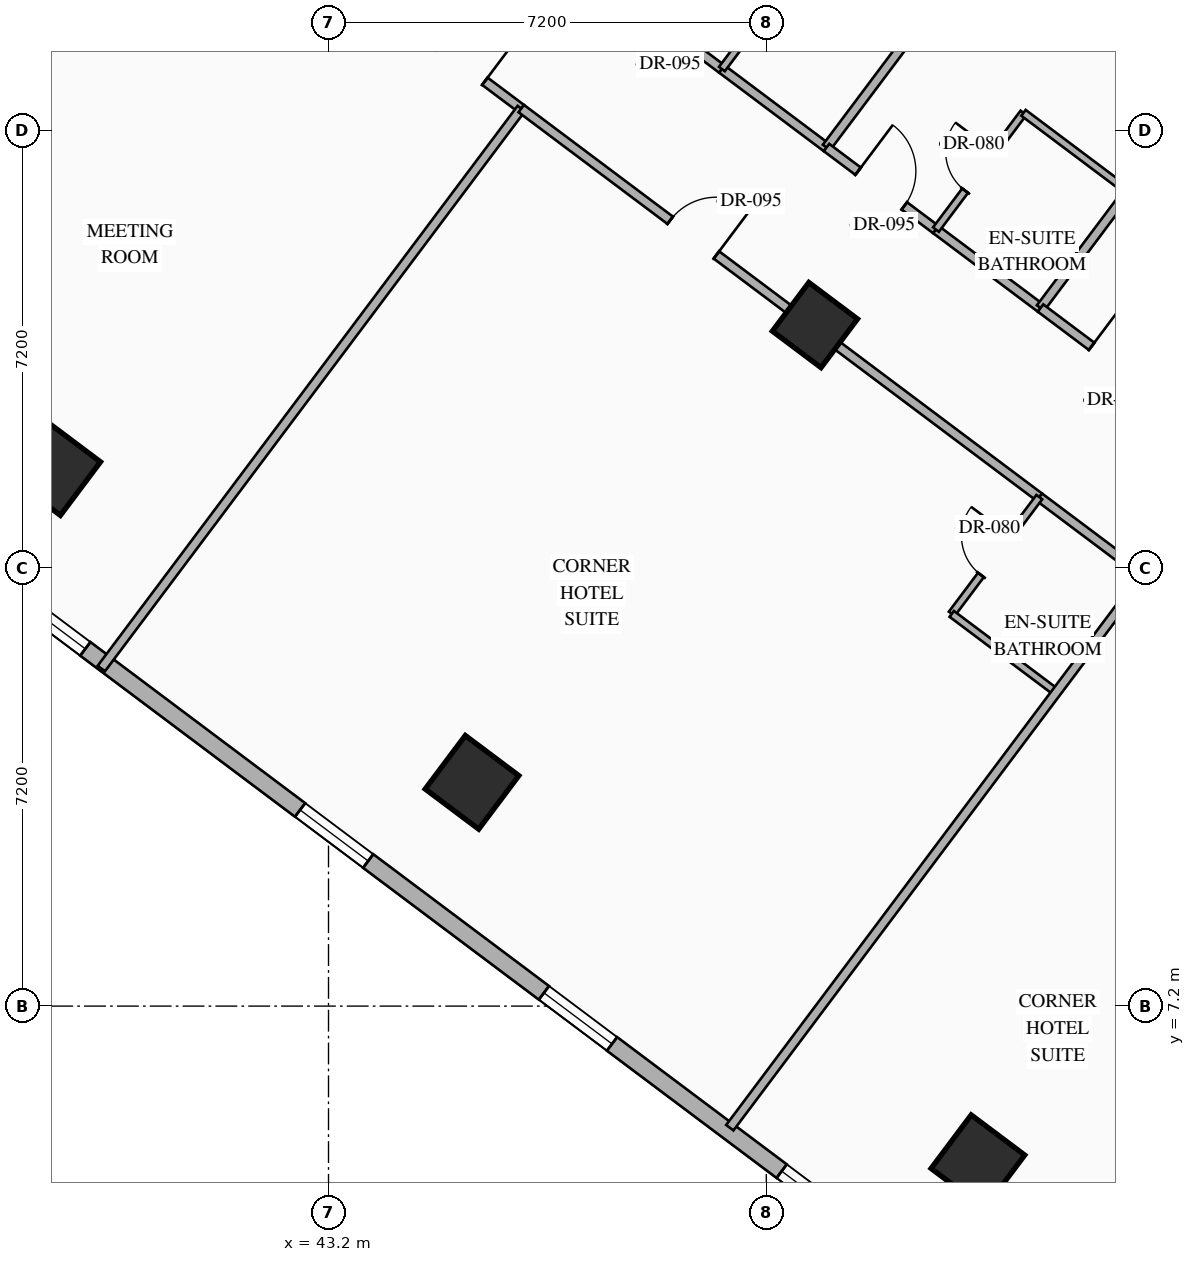
"""IFC4 building model, lengths in metres.
Left out: names, types, materials, properties, quantities, classifications, styles, units other than length and angle.
Written with IfcOpenShell. Run it as: python <this file> out.ifc"""

import sys

from ifc_helpers import new_model, si_unit, direction, frame, frame_2d, origin, origin_2d, place, context, subcontext, project, spatial, rectangle, hollow_rectangle, extrude, element, fill, save


model = new_model("IFC4")
c1 = context("Model", 3, precision=1e-05, world=origin(), true_north=direction((0.0, 1.0)))
c2 = subcontext(c1, "Body", "Model", "MODEL_VIEW")
j1 = project(units=[si_unit("LENGTHUNIT", "METRE"), si_unit("PLANEANGLEUNIT", "RADIAN")], contexts=[c1])
p1 = place(None, origin())
s1 = spatial("IfcSite", under=j1, at=p1, CompositionType="ELEMENT")
p2 = place(p1, origin())
s2 = spatial("IfcBuilding", under=s1, at=p2, CompositionType="ELEMENT")
p3 = place(p2, frame((0.0, 0.0, 60.05)))
s3 = spatial("IfcBuildingStorey", under=s2, at=p3, CompositionType="ELEMENT", Elevation=60.05)
for number, where, z_axis, x_axis in (
    (1, (38.68, 16.04, 0.0), (0.0, 0.0, 1.0), (0.8, -0.6, 0.0)),
    (2, (45.56, 10.88, 0.0), (0.0, 0.0, 1.0), (0.8, -0.6, 0.0)),
):
    element("IfcColumn", number, at=place(p3, frame(where, z_axis=z_axis, x_axis=x_axis)), inside=s3, PredefinedType="COLUMN", context=c2, shape_type="SweptSolid", body=[
        extrude(hollow_rectangle(XDim=1.1, YDim=1.1, WallThickness=0.04, at=origin_2d()), origin(), (0.0, 0.0, 1.0), 3.35),
    ])
p4 = place(p3, frame((51.2, 18.4, 0.0), z_axis=(0.0, 0.0, 1.0), x_axis=(0.799999996291, -0.600000004945, 0.0)))
e3 = element("IfcColumn", 3, at=p4, inside=s3, PredefinedType="COLUMN", context=c2, shape_type="SweptSolid", body=[
    extrude(hollow_rectangle(XDim=1.0, YDim=1.0, WallThickness=0.038, at=origin_2d()), origin(), (0.0, 0.0, 1.0), 3.35),
])
p5 = place(p3, frame((53.88, 4.64, 0.0), z_axis=(0.0, 0.0, 1.0), x_axis=(0.799999996291, -0.600000004945, 0.0)))
e4 = element("IfcColumn", 4, at=p5, inside=s3, PredefinedType="COLUMN", context=c2, shape_type="SweptSolid", body=[
    extrude(hollow_rectangle(XDim=1.1, YDim=1.1, WallThickness=0.04, at=origin_2d()), origin(), (0.0, 0.0, 1.0), 3.35),
])
p6 = place(p3, frame((44.86, 40.73, 0.0), z_axis=(0.0, 0.0, 1.0), x_axis=(0.800006902154, -0.599990797017, 0.0)))
e5 = element("IfcWall", 5, at=p6, inside=s3, PredefinedType="STANDARD", context=c2, shape_type="SweptSolid", body=[
    extrude(rectangle(XDim=29.712, YDim=0.28, at=frame_2d((14.856, 0.0))), origin(), (0.0, 0.0, 1.0), 3.13),
])
p7 = place(p6, frame((14.249, 0.0, 0.0)))
e6 = element("IfcOpeningElement", 6, at=p7, cuts=e5, PredefinedType="OPENING", context=c2, shape_type="SweptSolid", body=[
    extrude(rectangle(XDim=1.1, YDim=2.2, at=frame_2d((0.55, 1.1))), frame((0.0, 0.15, 0.0), z_axis=(0.0, -1.0, 0.0), x_axis=(1.0, 0.0, 0.0)), (0.0, 0.0, 1.0), 0.3),
])
p8 = place(p6, frame((1.612, 0.0, 0.85)))
e7 = element("IfcOpeningElement", 7, at=p8, cuts=e5, PredefinedType="OPENING", context=c2, shape_type="SweptSolid", body=[
    extrude(rectangle(XDim=1.4, YDim=1.8, at=frame_2d((0.7, 0.9))), frame((0.0, 0.15, 0.0), z_axis=(0.0, -1.0, 0.0), x_axis=(1.0, 0.0, 0.0)), (0.0, 0.0, 1.0), 0.3),
])
p9 = place(p6, frame((5.667, 0.0, 0.85)))
e8 = element("IfcOpeningElement", 8, at=p9, cuts=e5, PredefinedType="OPENING", context=c2, shape_type="SweptSolid", body=[
    extrude(rectangle(XDim=1.4, YDim=1.8, at=frame_2d((0.7, 0.9))), frame((0.0, 0.15, 0.0), z_axis=(0.0, -1.0, 0.0), x_axis=(1.0, 0.0, 0.0)), (0.0, 0.0, 1.0), 0.3),
])
p10 = place(p6, frame((9.912, 0.0, 0.85)))
e9 = element("IfcOpeningElement", 9, at=p10, cuts=e5, PredefinedType="OPENING", context=c2, shape_type="SweptSolid", body=[
    extrude(rectangle(XDim=1.4, YDim=1.8, at=frame_2d((0.7, 0.9))), frame((0.0, 0.15, 0.0), z_axis=(0.0, -1.0, 0.0), x_axis=(1.0, 0.0, 0.0)), (0.0, 0.0, 1.0), 0.3),
])
p11 = place(p6, frame((18.803, 0.0, 0.85)))
e10 = element("IfcOpeningElement", 10, at=p11, cuts=e5, PredefinedType="OPENING", context=c2, shape_type="SweptSolid", body=[
    extrude(rectangle(XDim=1.4, YDim=1.8, at=frame_2d((0.7, 0.9))), frame((0.0, 0.15, 0.0), z_axis=(0.0, -1.0, 0.0), x_axis=(1.0, 0.0, 0.0)), (0.0, 0.0, 1.0), 0.3),
])
p12 = place(p6, frame((22.645, 0.0, 0.85)))
e11 = element("IfcOpeningElement", 11, at=p12, cuts=e5, PredefinedType="OPENING", context=c2, shape_type="SweptSolid", body=[
    extrude(rectangle(XDim=1.4, YDim=1.8, at=frame_2d((0.7, 0.9))), frame((0.0, 0.15, 0.0), z_axis=(0.0, -1.0, 0.0), x_axis=(1.0, 0.0, 0.0)), (0.0, 0.0, 1.0), 0.3),
])
p13 = place(p6, frame((27.668, 0.0, 0.85)))
e12 = element("IfcOpeningElement", 12, at=p13, cuts=e5, PredefinedType="OPENING", context=c2, shape_type="SweptSolid", body=[
    extrude(rectangle(XDim=1.4, YDim=1.8, at=frame_2d((0.7, 0.9))), frame((0.0, 0.15, 0.0), z_axis=(0.0, -1.0, 0.0), x_axis=(1.0, 0.0, 0.0)), (0.0, 0.0, 1.0), 0.3),
])
p14 = place(p3, frame((53.318, 2.487, 0.0), z_axis=(0.0, 0.0, 1.0), x_axis=(-0.800004174678, 0.599994433723, 0.0)))
e13 = element("IfcWall", 13, at=p14, inside=s3, PredefinedType="STANDARD", context=c2, shape_type="SweptSolid", body=[
    extrude(rectangle(XDim=35.089, YDim=0.28, at=frame_2d((17.544, 0.0))), origin(), (0.0, 0.0, 1.0), 3.13),
])
p15 = place(p14, frame((1.931, 0.0, 0.85)))
e14 = element("IfcOpeningElement", 14, at=p15, cuts=e13, PredefinedType="OPENING", context=c2, shape_type="SweptSolid", body=[
    extrude(rectangle(XDim=1.4, YDim=1.8, at=frame_2d((0.7, 0.9))), frame((0.0, 0.15, 0.0), z_axis=(0.0, -1.0, 0.0), x_axis=(1.0, 0.0, 0.0)), (0.0, 0.0, 1.0), 0.3),
])
p16 = place(p14, frame((6.819, 0.0, 0.85)))
e15 = element("IfcOpeningElement", 15, at=p16, cuts=e13, PredefinedType="OPENING", context=c2, shape_type="SweptSolid", body=[
    extrude(rectangle(XDim=1.4, YDim=1.8, at=frame_2d((0.7, 0.9))), frame((0.0, 0.15, 0.0), z_axis=(0.0, -1.0, 0.0), x_axis=(1.0, 0.0, 0.0)), (0.0, 0.0, 1.0), 0.3),
])
p17 = place(p14, frame((11.832, 0.0, 0.85)))
e16 = element("IfcOpeningElement", 16, at=p17, cuts=e13, PredefinedType="OPENING", context=c2, shape_type="SweptSolid", body=[
    extrude(rectangle(XDim=1.4, YDim=1.8, at=frame_2d((0.7, 0.9))), frame((0.0, 0.15, 0.0), z_axis=(0.0, -1.0, 0.0), x_axis=(1.0, 0.0, 0.0)), (0.0, 0.0, 1.0), 0.3),
])
p18 = place(p14, frame((17.647, 0.0, 0.85)))
e17 = element("IfcOpeningElement", 17, at=p18, cuts=e13, PredefinedType="OPENING", context=c2, shape_type="SweptSolid", body=[
    extrude(rectangle(XDim=1.4, YDim=1.8, at=frame_2d((0.7, 0.9))), frame((0.0, 0.15, 0.0), z_axis=(0.0, -1.0, 0.0), x_axis=(1.0, 0.0, 0.0)), (0.0, 0.0, 1.0), 0.3),
])
p19 = place(p14, frame((21.857, 0.0, 0.85)))
e18 = element("IfcOpeningElement", 18, at=p19, cuts=e13, PredefinedType="OPENING", context=c2, shape_type="SweptSolid", body=[
    extrude(rectangle(XDim=1.4, YDim=1.8, at=frame_2d((0.7, 0.9))), frame((0.0, 0.15, 0.0), z_axis=(0.0, -1.0, 0.0), x_axis=(1.0, 0.0, 0.0)), (0.0, 0.0, 1.0), 0.3),
])
p20 = place(p14, frame((26.87, 0.0, 0.85)))
e19 = element("IfcOpeningElement", 19, at=p20, cuts=e13, PredefinedType="OPENING", context=c2, shape_type="SweptSolid", body=[
    extrude(rectangle(XDim=1.4, YDim=1.8, at=frame_2d((0.7, 0.9))), frame((0.0, 0.15, 0.0), z_axis=(0.0, -1.0, 0.0), x_axis=(1.0, 0.0, 0.0)), (0.0, 0.0, 1.0), 0.3),
])
p21 = place(p14, frame((31.757, 0.0, 0.85)))
e20 = element("IfcOpeningElement", 20, at=p21, cuts=e13, PredefinedType="OPENING", context=c2, shape_type="SweptSolid", body=[
    extrude(rectangle(XDim=1.4, YDim=1.8, at=frame_2d((0.7, 0.9))), frame((0.0, 0.15, 0.0), z_axis=(0.0, -1.0, 0.0), x_axis=(1.0, 0.0, 0.0)), (0.0, 0.0, 1.0), 0.3),
])
p22 = place(p3, frame((43.037, 24.46, 0.0), z_axis=(0.0, 0.0, 1.0), x_axis=(0.799971872363, -0.600037501685, 0.0)))
e21 = element("IfcWall", 21, at=p22, inside=s3, PredefinedType="PARTITIONING", context=c2, shape_type="SweptSolid", body=[
    extrude(rectangle(XDim=4.167, YDim=0.15, at=frame_2d((2.083, 0.0))), origin(), (0.0, 0.0, 1.0), 2.425),
])
p23 = place(p22, frame((2.468, 0.0, 0.0)))
e22 = element("IfcOpeningElement", 22, at=p23, cuts=e21, PredefinedType="OPENING", context=c2, shape_type="SweptSolid", body=[
    extrude(rectangle(XDim=0.95, YDim=2.15, at=frame_2d((0.475, 1.075))), frame((0.0, 0.085, 0.0), z_axis=(0.0, -1.0, 0.0), x_axis=(1.0, 0.0, 0.0)), (0.0, 0.0, 1.0), 0.17),
])
p24 = place(p3, frame((33.384, 17.312, 0.0), z_axis=(0.0, 0.0, 1.0), x_axis=(0.600008743659, 0.799993442181, 0.0)))
e23 = element("IfcWall", 23, at=p24, inside=s3, PredefinedType="PARTITIONING", context=c2, shape_type="SweptSolid", body=[
    extrude(rectangle(XDim=8.935, YDim=0.15, at=frame_2d((4.468, 0.0))), origin(), (0.0, 0.0, 1.0), 3.13),
])
p25 = place(p3, frame((39.464, 12.752, 0.0), z_axis=(0.0, 0.0, 1.0), x_axis=(0.6, 0.8, 0.0)))
e24 = element("IfcWall", 24, at=p25, inside=s3, PredefinedType="PARTITIONING", context=c2, shape_type="SweptSolid", body=[
    extrude(rectangle(XDim=11.51, YDim=0.15, at=frame_2d((5.755, 0.0))), origin(), (0.0, 0.0, 1.0), 3.13),
])
p26 = place(p3, frame((47.87, 23.96, 0.0), z_axis=(0.0, 0.0, 1.0), x_axis=(0.8, -0.6, 0.0)))
e25 = element("IfcWall", 25, at=p26, inside=s3, PredefinedType="PARTITIONING", context=c2, shape_type="SweptSolid", body=[
    extrude(rectangle(XDim=2.25, YDim=0.15, at=frame_2d((1.125, 0.0))), origin(), (0.0, 0.0, 1.0), 2.775),
])
p27 = place(p26, frame((0.65, 0.0, 0.0)))
e26 = element("IfcOpeningElement", 26, at=p27, cuts=e25, PredefinedType="OPENING", context=c2, shape_type="SweptSolid", body=[
    extrude(rectangle(XDim=0.95, YDim=2.15, at=frame_2d((0.475, 1.075))), frame((0.0, 0.085, 0.0), z_axis=(0.0, -1.0, 0.0), x_axis=(1.0, 0.0, 0.0)), (0.0, 0.0, 1.0), 0.17),
])
p28 = place(p3, frame((49.67, 22.61, 0.0), z_axis=(0.0, 0.0, 1.0), x_axis=(0.79998637334, -0.60001816845, 0.0)))
e27 = element("IfcWall", 27, at=p28, inside=s3, PredefinedType="PARTITIONING", context=c2, shape_type="SweptSolid", body=[
    extrude(rectangle(XDim=2.15, YDim=0.15, at=frame_2d((1.075, 0.0))), origin(), (0.0, 0.0, 1.0), 2.775),
])
p29 = place(p3, frame((49.67, 22.61, 0.0), z_axis=(0.0, 0.0, 1.0), x_axis=(0.600065100855, 0.79995117022, 0.0)))
e28 = element("IfcWall", 28, at=p29, inside=s3, PredefinedType="PARTITIONING", context=c2, shape_type="SweptSolid", body=[
    extrude(rectangle(XDim=2.4, YDim=0.12, at=frame_2d((1.2, 0.0))), origin(), (0.0, 0.0, 1.0), 3.13),
])
p30 = place(p29, frame((0.8, 0.0, 0.0)))
e29 = element("IfcOpeningElement", 29, at=p30, cuts=e28, PredefinedType="OPENING", context=c2, shape_type="SweptSolid", body=[
    extrude(rectangle(XDim=0.8, YDim=2.06, at=frame_2d((0.4, 1.03))), frame((0.0, 0.07, 0.0), z_axis=(0.0, -1.0, 0.0), x_axis=(1.0, 0.0, 0.0)), (0.0, 0.0, 1.0), 0.14),
])
p31 = place(p3, frame((51.39, 21.32, 0.0), z_axis=(0.0, 0.0, 1.0), x_axis=(0.60001014597, 0.799992390422, 0.0)))
e30 = element("IfcWall", 30, at=p31, inside=s3, PredefinedType="PARTITIONING", context=c2, shape_type="SweptSolid", body=[
    extrude(rectangle(XDim=11.55, YDim=0.15, at=frame_2d((5.775, 0.0))), origin(), (0.0, 0.0, 1.0), 3.13),
])
p32 = place(p3, frame((51.39, 21.32, 0.0), z_axis=(0.0, 0.0, 1.0), x_axis=(0.799986979543, -0.600017360216, 0.0)))
e31 = element("IfcWall", 31, at=p32, inside=s3, PredefinedType="PARTITIONING", context=c2, shape_type="SweptSolid", body=[
    extrude(rectangle(XDim=2.25, YDim=0.15, at=frame_2d((1.125, 0.0))), origin(), (0.0, 0.0, 1.0), 2.775),
])
p33 = place(p32, frame((0.65, 0.0, 0.0)))
e32 = element("IfcOpeningElement", 32, at=p33, cuts=e31, PredefinedType="OPENING", context=c2, shape_type="SweptSolid", body=[
    extrude(rectangle(XDim=0.95, YDim=2.15, at=frame_2d((0.475, 1.075))), frame((0.0, 0.085, 0.0), z_axis=(0.0, -1.0, 0.0), x_axis=(1.0, 0.0, 0.0)), (0.0, 0.0, 1.0), 0.17),
])
p34 = place(p3, frame((53.19, 19.97, 0.0), z_axis=(0.0, 0.0, 1.0), x_axis=(0.79998637334, -0.60001816845, 0.0)))
e33 = element("IfcWall", 33, at=p34, inside=s3, PredefinedType="PARTITIONING", context=c2, shape_type="SweptSolid", body=[
    extrude(rectangle(XDim=2.15, YDim=0.15, at=frame_2d((1.075, 0.0))), origin(), (0.0, 0.0, 1.0), 2.775),
])
p35 = place(p3, frame((53.19, 19.97, 0.0), z_axis=(0.0, 0.0, 1.0), x_axis=(0.6, 0.8, 0.0)))
e34 = element("IfcWall", 34, at=p35, inside=s3, PredefinedType="PARTITIONING", context=c2, shape_type="SweptSolid", body=[
    extrude(rectangle(XDim=2.4, YDim=0.12, at=frame_2d((1.2, 0.0))), origin(), (0.0, 0.0, 1.0), 3.13),
])
p36 = place(p35, frame((0.8, 0.0, 0.0)))
e35 = element("IfcOpeningElement", 35, at=p36, cuts=e34, PredefinedType="OPENING", context=c2, shape_type="SweptSolid", body=[
    extrude(rectangle(XDim=0.8, YDim=2.06, at=frame_2d((0.4, 1.03))), frame((0.0, 0.07, 0.0), z_axis=(0.0, -1.0, 0.0), x_axis=(1.0, 0.0, 0.0)), (0.0, 0.0, 1.0), 0.14),
])
p37 = place(p3, frame((54.63, 21.89, 0.0), z_axis=(0.0, 0.0, 1.0), x_axis=(0.800081749437, -0.599890985279, 0.0)))
e36 = element("IfcWall", 36, at=p37, inside=s3, PredefinedType="PARTITIONING", context=c2, shape_type="SweptSolid", body=[
    extrude(rectangle(XDim=2.15, YDim=0.12, at=frame_2d((1.075, 0.0))), origin(), (0.0, 0.0, 1.0), 3.13),
])
p38 = place(p3, frame((54.91, 18.68, 0.0), z_axis=(0.0, 0.0, 1.0), x_axis=(0.60001014597, 0.799992390422, 0.0)))
e37 = element("IfcWall", 37, at=p38, inside=s3, PredefinedType="PARTITIONING", context=c2, shape_type="SweptSolid", body=[
    extrude(rectangle(XDim=11.55, YDim=0.15, at=frame_2d((5.775, 0.0))), origin(), (0.0, 0.0, 1.0), 3.13),
])
p39 = place(p3, frame((54.91, 18.68, 0.0), z_axis=(0.0, 0.0, 1.0), x_axis=(0.800048024332, -0.599935962218, 0.0)))
e38 = element("IfcWall", 38, at=p39, inside=s3, PredefinedType="PARTITIONING", context=c2, shape_type="SweptSolid", body=[
    extrude(rectangle(XDim=3.05, YDim=0.15, at=frame_2d((1.525, 0.0))), origin(), (0.0, 0.0, 1.0), 2.775),
])
p40 = place(p39, frame((1.05, 0.0, 0.0)))
e39 = element("IfcOpeningElement", 39, at=p40, cuts=e38, PredefinedType="OPENING", context=c2, shape_type="SweptSolid", body=[
    extrude(rectangle(XDim=0.95, YDim=2.15, at=frame_2d((0.475, 1.075))), frame((0.0, 0.085, 0.0), z_axis=(0.0, -1.0, 0.0), x_axis=(1.0, 0.0, 0.0)), (0.0, 0.0, 1.0), 0.17),
])
p41 = place(p3, frame((46.37, 21.96, 0.0), z_axis=(0.0, 0.0, 1.0), x_axis=(0.799997249048, -0.600003667918, 0.0)))
e40 = element("IfcWall", 40, at=p41, inside=s3, PredefinedType="PARTITIONING", context=c2, shape_type="SweptSolid", body=[
    extrude(rectangle(XDim=10.65, YDim=0.15, at=frame_2d((5.325, 0.0))), origin(), (0.0, 0.0, 1.0), 2.425),
])
p42 = place(p41, frame((3.062, 0.0, 0.0)))
e41 = element("IfcOpeningElement", 41, at=p42, cuts=e40, PredefinedType="OPENING", context=c2, shape_type="SweptSolid", body=[
    extrude(rectangle(XDim=0.95, YDim=2.15, at=frame_2d((0.475, 1.075))), frame((0.0, 0.085, 0.0), z_axis=(0.0, -1.0, 0.0), x_axis=(1.0, 0.0, 0.0)), (0.0, 0.0, 1.0), 0.17),
])
p43 = place(p3, frame((54.89, 15.57, 0.0), z_axis=(0.0, 0.0, 1.0), x_axis=(0.800027249606, -0.599963665473, 0.0)))
e42 = element("IfcWall", 42, at=p43, inside=s3, PredefinedType="PARTITIONING", context=c2, shape_type="SweptSolid", body=[
    extrude(rectangle(XDim=2.15, YDim=0.15, at=frame_2d((1.075, 0.0))), origin(), (0.0, 0.0, 1.0), 2.425),
])
p44 = place(p3, frame((53.45, 13.65, 0.0), z_axis=(0.0, 0.0, 1.0), x_axis=(0.599951172744, 0.800036618114, 0.0)))
e43 = element("IfcWall", 43, at=p44, inside=s3, PredefinedType="PARTITIONING", context=c2, shape_type="SweptSolid", body=[
    extrude(rectangle(XDim=2.4, YDim=0.12, at=frame_2d((1.2, 0.0))), origin(), (0.0, 0.0, 1.0), 3.13),
])
p45 = place(p44, frame((0.8, 0.0, 0.0)))
e44 = element("IfcOpeningElement", 44, at=p45, cuts=e43, PredefinedType="OPENING", context=c2, shape_type="SweptSolid", body=[
    extrude(rectangle(XDim=0.8, YDim=2.06, at=frame_2d((0.4, 1.03))), frame((0.0, 0.07, 0.0), z_axis=(0.0, -1.0, 0.0), x_axis=(1.0, 0.0, 0.0)), (0.0, 0.0, 1.0), 0.14),
])
p46 = place(p3, frame((53.45, 13.65, 0.0), z_axis=(0.0, 0.0, 1.0), x_axis=(0.800040880289, -0.59994548908, 0.0)))
e45 = element("IfcWall", 45, at=p46, inside=s3, PredefinedType="PARTITIONING", context=c2, shape_type="SweptSolid", body=[
    extrude(rectangle(XDim=2.15, YDim=0.12, at=frame_2d((1.075, 0.0))), origin(), (0.0, 0.0, 1.0), 3.13),
])
p47 = place(p3, frame((49.8, 5.2, 0.0), z_axis=(0.0, 0.0, 1.0), x_axis=(0.6, 0.8, 0.0)))
e46 = element("IfcWall", 46, at=p47, inside=s3, PredefinedType="PARTITIONING", context=c2, shape_type="SweptSolid", body=[
    extrude(rectangle(XDim=11.35, YDim=0.15, at=frame_2d((5.675, 0.0))), origin(), (0.0, 0.0, 1.0), 3.13),
])
p48 = place(p15, origin())
e47 = element("IfcWindow", 47, at=p48, inside=s3, PartitioningType="SINGLE_PANEL", PredefinedType="WINDOW", context=c2, shape_type="SweptSolid", body=[
    extrude(rectangle(XDim=1.4, YDim=1.8, at=frame_2d((0.7, 0.9))), frame((0.0, 0.03, 0.0), z_axis=(0.0, -1.0, 0.0), x_axis=(1.0, 0.0, 0.0)), (0.0, 0.0, 1.0), 0.06),
])
fill(e14, e47)
p49 = place(p16, origin())
e48 = element("IfcWindow", 48, at=p49, inside=s3, PartitioningType="SINGLE_PANEL", PredefinedType="WINDOW", context=c2, shape_type="SweptSolid", body=[
    extrude(rectangle(XDim=1.4, YDim=1.8, at=frame_2d((0.7, 0.9))), frame((0.0, 0.03, 0.0), z_axis=(0.0, -1.0, 0.0), x_axis=(1.0, 0.0, 0.0)), (0.0, 0.0, 1.0), 0.06),
])
fill(e15, e48)
p50 = place(p17, origin())
e49 = element("IfcWindow", 49, at=p50, inside=s3, PartitioningType="SINGLE_PANEL", PredefinedType="WINDOW", context=c2, shape_type="SweptSolid", body=[
    extrude(rectangle(XDim=1.4, YDim=1.8, at=frame_2d((0.7, 0.9))), frame((0.0, 0.03, 0.0), z_axis=(0.0, -1.0, 0.0), x_axis=(1.0, 0.0, 0.0)), (0.0, 0.0, 1.0), 0.06),
])
fill(e16, e49)
p51 = place(p18, origin())
e50 = element("IfcWindow", 50, at=p51, inside=s3, PartitioningType="SINGLE_PANEL", PredefinedType="WINDOW", context=c2, shape_type="SweptSolid", body=[
    extrude(rectangle(XDim=1.4, YDim=1.8, at=frame_2d((0.7, 0.9))), frame((0.0, 0.03, 0.0), z_axis=(0.0, -1.0, 0.0), x_axis=(1.0, 0.0, 0.0)), (0.0, 0.0, 1.0), 0.06),
])
fill(e17, e50)
p52 = place(p23, origin())
e51 = element("IfcDoor", 51, at=p52, inside=s3, OperationType="SINGLE_SWING_RIGHT", PredefinedType="DOOR", context=c2, shape_type="SweptSolid", body=[
    extrude(rectangle(XDim=0.95, YDim=2.15, at=frame_2d((0.475, 1.075))), frame((0.0, 0.025, 0.0), z_axis=(0.0, -1.0, 0.0), x_axis=(1.0, 0.0, 0.0)), (0.0, 0.0, 1.0), 0.05),
])
fill(e22, e51)
p53 = place(p33, origin())
e52 = element("IfcDoor", 52, at=p53, inside=s3, OperationType="SINGLE_SWING_LEFT", PredefinedType="DOOR", context=c2, shape_type="SweptSolid", body=[
    extrude(rectangle(XDim=0.95, YDim=2.15, at=frame_2d((0.475, 1.075))), frame((0.0, 0.025, 0.0), z_axis=(0.0, -1.0, 0.0), x_axis=(1.0, 0.0, 0.0)), (0.0, 0.0, 1.0), 0.05),
])
fill(e32, e52)
p54 = place(p36, origin())
e53 = element("IfcDoor", 53, at=p54, inside=s3, OperationType="SINGLE_SWING_RIGHT", PredefinedType="DOOR", context=c2, shape_type="SweptSolid", body=[
    extrude(rectangle(XDim=0.8, YDim=2.06, at=frame_2d((0.4, 1.03))), frame((0.0, 0.025, 0.0), z_axis=(0.0, -1.0, 0.0), x_axis=(1.0, 0.0, 0.0)), (0.0, 0.0, 1.0), 0.05),
])
fill(e35, e53)
p55 = place(p40, origin())
e54 = element("IfcDoor", 54, at=p55, inside=s3, OperationType="SINGLE_SWING_LEFT", PredefinedType="DOOR", context=c2, shape_type="SweptSolid", body=[
    extrude(rectangle(XDim=0.95, YDim=2.15, at=frame_2d((0.475, 1.075))), frame((0.0, 0.025, 0.0), z_axis=(0.0, -1.0, 0.0), x_axis=(1.0, 0.0, 0.0)), (0.0, 0.0, 1.0), 0.05),
])
fill(e39, e54)
p56 = place(p42, origin())
e55 = element("IfcDoor", 55, at=p56, inside=s3, OperationType="SINGLE_SWING_RIGHT", PredefinedType="DOOR", context=c2, shape_type="SweptSolid", body=[
    extrude(rectangle(XDim=0.95, YDim=2.15, at=frame_2d((0.475, 1.075))), frame((0.0, 0.025, 0.0), z_axis=(0.0, -1.0, 0.0), x_axis=(1.0, 0.0, 0.0)), (0.0, 0.0, 1.0), 0.05),
])
fill(e41, e55)
p57 = place(p45, origin())
e56 = element("IfcDoor", 56, at=p57, inside=s3, OperationType="SINGLE_SWING_RIGHT", PredefinedType="DOOR", context=c2, shape_type="SweptSolid", body=[
    extrude(rectangle(XDim=0.8, YDim=2.06, at=frame_2d((0.4, 1.03))), frame((0.0, 0.025, 0.0), z_axis=(0.0, -1.0, 0.0), x_axis=(1.0, 0.0, 0.0)), (0.0, 0.0, 1.0), 0.05),
])
fill(e44, e56)
save(model, sys.argv[1])
